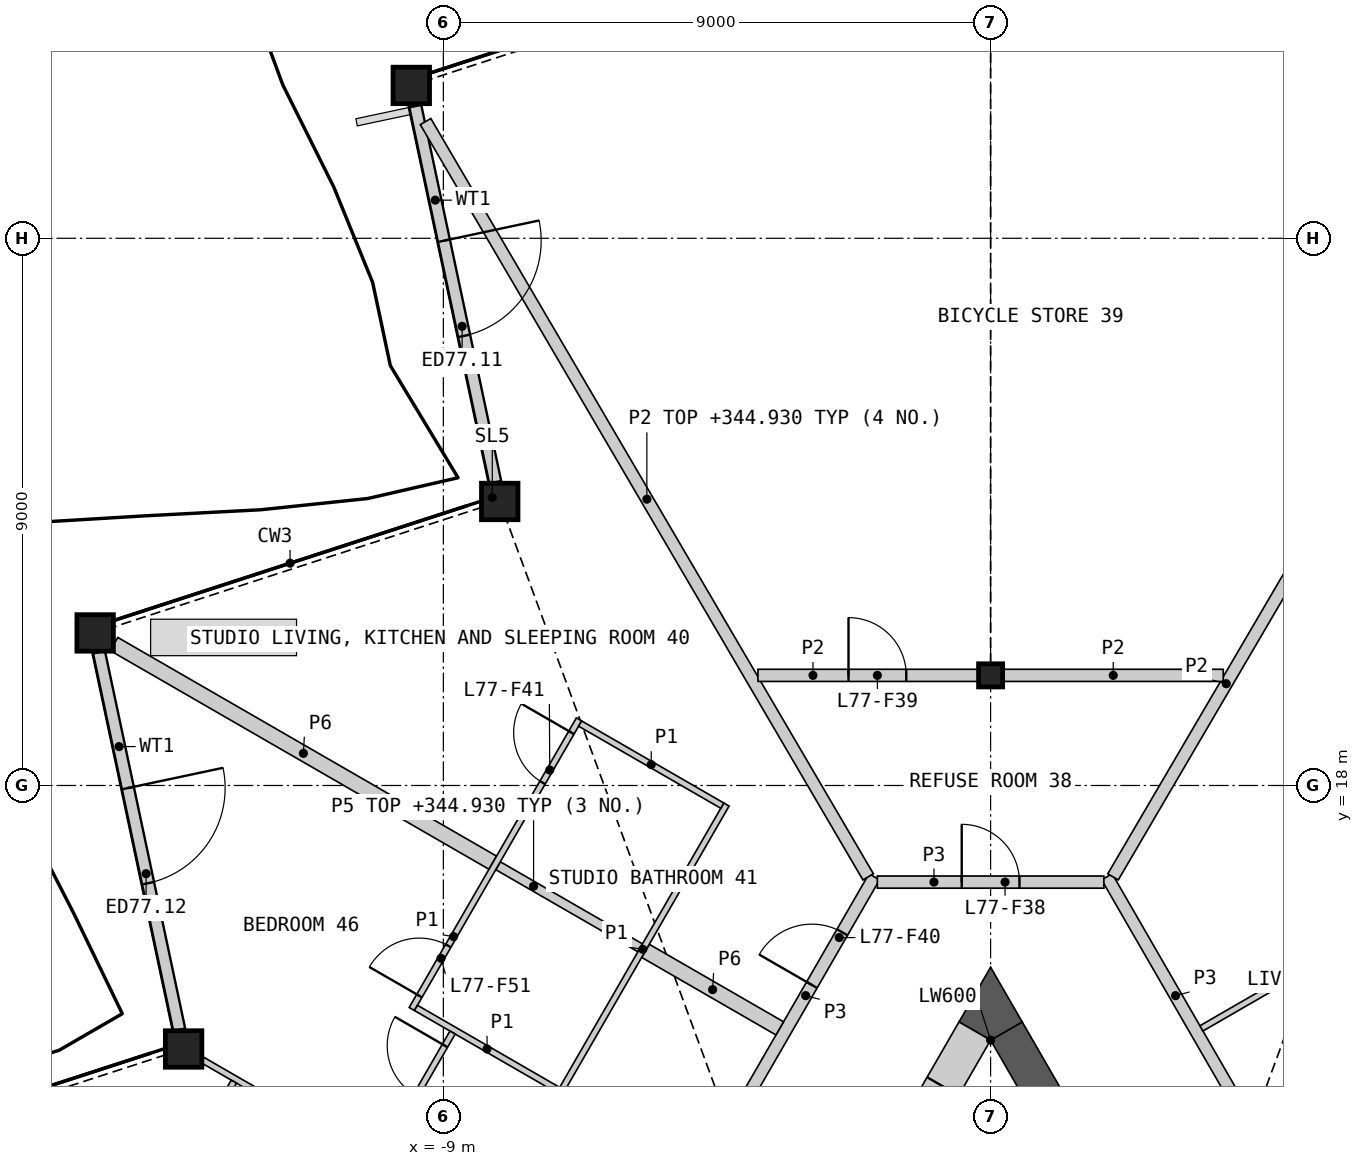
"""IFC4 building model, lengths in metres.
Left out: names, types, materials, properties, quantities, classifications, styles, units other than length and angle.
Written with IfcOpenShell. Run it as: python <this file> out.ifc"""

import sys

from ifc_helpers import new_model, si_unit, direction, frame, frame_2d, origin, origin_2d, place, context, subcontext, project, spatial, polyline, rectangle, hollow_rectangle, i_section, outline, extrude, element, fill, save


model = new_model("IFC4")
c1 = context("Model", 3, precision=1e-05, world=origin(), true_north=direction((0.0, 1.0)))
c2 = subcontext(c1, "Body", "Model", "MODEL_VIEW")
j1 = project(units=[si_unit("LENGTHUNIT", "METRE"), si_unit("PLANEANGLEUNIT", "RADIAN")], contexts=[c1])
p1 = place(None, origin())
s1 = spatial("IfcSite", under=j1, at=p1, CompositionType="ELEMENT")
p2 = place(p1, origin())
s2 = spatial("IfcBuilding", under=s1, at=p2, CompositionType="ELEMENT")
p3 = place(p2, frame((0.0, 0.0, 342.6)))
s3 = spatial("IfcBuildingStorey", under=s2, at=p3, CompositionType="ELEMENT", Elevation=342.6)
for number, where, z_axis, x_axis in (
    (1, (-9.527, 29.514, 0.0), (0.0, 0.0, 1.0), (1.0, 0.0, 0.0)),
    (2, (-8.073, 22.671, 0.0), (0.0, 0.0, 1.0), (1.0, 0.0, 0.0)),
    (3, (-14.727, 20.509, 0.0), (0.0, 0.0, 1.0), (1.0, 0.0, 0.0)),
    (4, (-13.272, 13.666, 0.0), (0.0, 0.0, 1.0), (1.0, 0.0, 0.0)),
):
    element("IfcColumn", number, at=place(p3, frame(where, z_axis=z_axis, x_axis=x_axis)), inside=s3, PredefinedType="COLUMN", context=c2, shape_type="SweptSolid", body=[
        extrude(hollow_rectangle(XDim=0.6, YDim=0.6, WallThickness=0.04, at=origin_2d()), origin(), (0.0, 0.0, 1.0), 3.4),
    ])
p4 = place(p3, frame((0.0, 19.811, 0.0), z_axis=(0.0, 0.0, 1.0), x_axis=(1.0, 0.0, 0.0)))
e5 = element("IfcColumn", 5, at=p4, inside=s3, PredefinedType="COLUMN", context=c2, shape_type="SweptSolid", body=[
    extrude(i_section(OverallWidth=0.396, OverallDepth=0.381, WebThickness=0.019, FlangeThickness=0.03, at=origin_2d()), origin(), (0.0, 0.0, 1.0), 3.4),
])
p5 = place(p3, frame((9.206, 29.616, 0.0), z_axis=(0.0, 0.0, 1.0), x_axis=(-0.951056221468, 0.309017901757, 0.0)))
e6 = element("IfcWall", 6, at=p5, inside=s3, PredefinedType="SOLIDWALL", context=c2, shape_type="SweptSolid", body=[
    extrude(rectangle(XDim=6.316, YDim=0.2, at=frame_2d((3.158, 0.0))), origin(), (0.0, 0.0, 1.0), 2.488),
])
p6 = place(p5, frame((2.263, 0.0, 0.0)))
e7 = element("IfcOpeningElement", 7, at=p6, cuts=e6, PredefinedType="OPENING", context=c2, shape_type="SweptSolid", body=[
    extrude(rectangle(XDim=1.6, YDim=2.25, at=frame_2d((0.8, 1.125))), frame((0.0, 0.11, 0.0), z_axis=(0.0, -1.0, 0.0), x_axis=(1.0, 0.0, 0.0)), (0.0, 0.0, 1.0), 0.22),
])
p7 = place(p3, frame((-9.461, 29.174, 0.0), z_axis=(0.0, 0.0, 1.0), x_axis=(0.20791277238, -0.97814737084, 0.0)))
e8 = element("IfcWall", 8, at=p7, inside=s3, PredefinedType="SOLIDWALL", context=c2, shape_type="SweptSolid", body=[
    extrude(rectangle(XDim=6.324, YDim=0.2, at=frame_2d((3.162, 0.0))), origin(), (0.0, 0.0, 1.0), 2.488),
])
p8 = place(p7, frame((2.263, 0.0, 0.0)))
e9 = element("IfcOpeningElement", 9, at=p8, cuts=e8, PredefinedType="OPENING", context=c2, shape_type="SweptSolid", body=[
    extrude(rectangle(XDim=1.6, YDim=2.25, at=frame_2d((0.8, 1.125))), frame((0.0, 0.11, 0.0), z_axis=(0.0, -1.0, 0.0), x_axis=(1.0, 0.0, 0.0)), (0.0, 0.0, 1.0), 0.22),
])
p9 = place(p3, frame((-14.663, 20.192, 0.0), z_axis=(0.0, 0.0, 1.0), x_axis=(0.207897850695, -0.97815054244, 0.0)))
e10 = element("IfcWall", 10, at=p9, inside=s3, PredefinedType="SOLIDWALL", context=c2, shape_type="SweptSolid", body=[
    extrude(rectangle(XDim=6.348, YDim=0.2, at=frame_2d((3.174, 0.0))), origin(), (0.0, 0.0, 1.0), 2.488),
])
p10 = place(p9, frame((2.285, 0.0, 0.0)))
e11 = element("IfcOpeningElement", 11, at=p10, cuts=e10, PredefinedType="OPENING", context=c2, shape_type="SweptSolid", body=[
    extrude(rectangle(XDim=1.6, YDim=2.25, at=frame_2d((0.8, 1.125))), frame((0.0, 0.11, 0.0), z_axis=(0.0, -1.0, 0.0), x_axis=(1.0, 0.0, 0.0)), (0.0, 0.0, 1.0), 0.22),
])
p11 = place(p3, frame((2.361, 10.322, 0.0), z_axis=(0.0, 0.0, 1.0), x_axis=(-0.500000735859, 0.866024978935, 0.0)))
e12 = element("IfcWall", 12, at=p11, inside=s3, PredefinedType="SHEAR", context=c2, shape_type="SweptSolid", body=[
    extrude(rectangle(XDim=4.202, YDim=0.6, at=frame_2d((2.101, 0.0))), origin(), (0.0, 0.0, 1.0), 3.1),
])
p12 = place(p3, origin())
e13 = element("IfcWall", 13, at=p12, inside=s3, PredefinedType="SHEAR", context=c2, shape_type="SweptSolid", body=[
    extrude(outline(polyline([(0.0, 13.811), (-0.52, 14.111), (0.0, 15.011), (0.52, 14.111), (0.0, 13.811)])), origin(), (0.0, 0.0, 1.0), 3.1),
])
p13 = place(p3, frame((-0.26, 13.961, 0.0), z_axis=(0.0, 0.0, 1.0), x_axis=(-0.49997936161, -0.866037319036, 0.0)))
e14 = element("IfcWall", 14, at=p13, inside=s3, PredefinedType="SHEAR", context=c2, shape_type="SweptSolid", body=[
    extrude(rectangle(XDim=2.66, YDim=0.6, at=frame_2d((1.33, 0.0))), origin(), (0.0, 0.0, 1.0), 3.1),
])
p14 = place(p13, frame((1.05, 0.0, 0.0)))
e15 = element("IfcOpeningElement", 15, at=p14, cuts=e14, PredefinedType="OPENING", context=c2, shape_type="SweptSolid", body=[
    extrude(rectangle(XDim=1.0, YDim=2.1, at=frame_2d((0.5, 1.05))), frame((0.0, 0.31, 0.0), z_axis=(0.0, -1.0, 0.0), x_axis=(1.0, 0.0, 0.0)), (0.0, 0.0, 1.0), 0.62),
])
p15 = place(p3, frame((-14.417, 20.327, 0.0), z_axis=(0.0, 0.0, 1.0), x_axis=(0.866018271907, -0.50001235257, 0.0)))
e16 = element("IfcWall", 16, at=p15, inside=s3, PredefinedType="PARTITIONING", context=c2, shape_type="SweptSolid", body=[
    extrude(rectangle(XDim=7.193, YDim=0.25, at=frame_2d((3.596, 0.0))), origin(), (0.0, 0.0, 1.0), 2.33),
])
p16 = place(p3, frame((-4.169, 12.59, 0.0), z_axis=(0.0, 0.0, 1.0), x_axis=(0.499950370306, 0.866054055606, 0.0)))
e17 = element("IfcWall", 17, at=p16, inside=s3, PredefinedType="PARTITIONING", context=c2, shape_type="SweptSolid", body=[
    extrude(rectangle(XDim=4.513, YDim=0.2, at=frame_2d((2.256, 0.0))), origin(), (0.0, 0.0, 1.0), 3.1),
])
p17 = place(p16, frame((2.459, 0.0, 0.0)))
e18 = element("IfcOpeningElement", 18, at=p17, cuts=e17, PredefinedType="OPENING", context=c2, shape_type="SweptSolid", body=[
    extrude(rectangle(XDim=1.0, YDim=2.1, at=frame_2d((0.5, 1.05))), frame((0.0, 0.11, 0.0), z_axis=(0.0, -1.0, 0.0), x_axis=(1.0, 0.0, 0.0)), (0.0, 0.0, 1.0), 0.22),
])
p18 = place(p3, frame((1.913, 16.498, 0.0), z_axis=(0.0, 0.0, 1.0), x_axis=(0.499950370306, -0.866054055606, 0.0)))
e19 = element("IfcWall", 19, at=p18, inside=s3, PredefinedType="PARTITIONING", context=c2, shape_type="SweptSolid", body=[
    extrude(rectangle(XDim=4.513, YDim=0.2, at=frame_2d((2.256, 0.0))), origin(), (0.0, 0.0, 1.0), 3.1),
])
p19 = place(p3, frame((-1.863, 16.411, 0.0), z_axis=(0.0, 0.0, 1.0), x_axis=(1.0, 0.0, 0.0)))
e20 = element("IfcWall", 20, at=p19, inside=s3, PredefinedType="PARTITIONING", context=c2, shape_type="SweptSolid", body=[
    extrude(rectangle(XDim=3.726, YDim=0.2, at=frame_2d((1.863, 0.0))), origin(), (0.0, 0.0, 1.0), 3.1),
])
p20 = place(p19, frame((1.388, 0.0, 0.0)))
e21 = element("IfcOpeningElement", 21, at=p20, cuts=e20, PredefinedType="OPENING", context=c2, shape_type="SweptSolid", body=[
    extrude(rectangle(XDim=0.95, YDim=2.1, at=frame_2d((0.475, 1.05))), frame((0.0, 0.11, 0.0), z_axis=(0.0, -1.0, 0.0), x_axis=(1.0, 0.0, 0.0)), (0.0, 0.0, 1.0), 0.22),
])
p21 = place(p3, frame((-5.676, 15.28, 0.0), z_axis=(0.0, 0.0, 1.0), x_axis=(0.865989465428, -0.500062241894, 0.0)))
e22 = element("IfcWall", 22, at=p21, inside=s3, PredefinedType="PARTITIONING", context=c2, shape_type="SweptSolid", body=[
    extrude(rectangle(XDim=2.55, YDim=0.25, at=frame_2d((1.275, 0.0))), origin(), (0.0, 0.0, 1.0), 2.33),
])
p22 = place(p3, frame((-9.292, 28.919, 0.0), z_axis=(0.0, 0.0, 1.0), x_axis=(0.505558038556, -0.862792599442, 0.0)))
e23 = element("IfcWall", 23, at=p22, inside=s3, PredefinedType="PARTITIONING", context=c2, shape_type="SweptSolid", body=[
    extrude(rectangle(XDim=14.397, YDim=0.2, at=frame_2d((7.199, 0.0))), origin(), (0.0, 0.0, 1.0), 2.33),
])
p23 = place(p3, frame((2.014, 16.497, 0.0), z_axis=(0.0, 0.0, 1.0), x_axis=(0.5055676136, 0.862786988821, 0.0)))
e24 = element("IfcWall", 24, at=p23, inside=s3, PredefinedType="PARTITIONING", context=c2, shape_type="SweptSolid", body=[
    extrude(rectangle(XDim=14.728, YDim=0.2, at=frame_2d((7.364, 0.0))), origin(), (0.0, 0.0, 1.0), 2.33),
])
p24 = place(p3, frame((-3.826, 19.811, 0.0), z_axis=(0.0, 0.0, 1.0), x_axis=(1.0, 0.0, 0.0)))
e25 = element("IfcWall", 25, at=p24, inside=s3, PredefinedType="PARTITIONING", context=c2, shape_type="SweptSolid", body=[
    extrude(rectangle(XDim=3.618, YDim=0.2, at=frame_2d((1.809, 0.0))), origin(), (0.0, 0.0, 1.0), 2.33),
])
p25 = place(p24, frame((1.489, 0.0, 0.0)))
e26 = element("IfcOpeningElement", 26, at=p25, cuts=e25, PredefinedType="OPENING", context=c2, shape_type="SweptSolid", body=[
    extrude(rectangle(XDim=0.95, YDim=2.1, at=frame_2d((0.475, 1.05))), frame((0.0, 0.11, 0.0), z_axis=(0.0, -1.0, 0.0), x_axis=(1.0, 0.0, 0.0)), (0.0, 0.0, 1.0), 0.22),
])
p26 = place(p3, frame((0.208, 19.811, 0.0), z_axis=(0.0, 0.0, 1.0), x_axis=(1.0, 0.0, 0.0)))
e27 = element("IfcWall", 27, at=p26, inside=s3, PredefinedType="PARTITIONING", context=c2, shape_type="SweptSolid", body=[
    extrude(rectangle(XDim=3.618, YDim=0.2, at=frame_2d((1.809, 0.0))), origin(), (0.0, 0.0, 1.0), 2.33),
])
p27 = place(p3, frame((-8.101, 16.68, 0.0), z_axis=(0.0, 0.0, 1.0), x_axis=(0.866019956843, -0.50000943426, 0.0)))
e28 = element("IfcWall", 28, at=p27, inside=s3, PredefinedType="PLUMBINGWALL", context=c2, shape_type="SweptSolid", body=[
    extrude(rectangle(XDim=2.7, YDim=0.15, at=frame_2d((1.35, 0.0))), origin(), (0.0, 0.0, 1.0), 2.33),
])
p28 = place(p3, frame((3.468, 14.005, 0.0), z_axis=(0.0, 0.0, 1.0), x_axis=(0.866020616849, 0.500008291124, 0.0)))
e29 = element("IfcWall", 29, at=p28, inside=s3, PredefinedType="PARTITIONING", context=c2, shape_type="SweptSolid", body=[
    extrude(rectangle(XDim=12.643, YDim=0.1, at=frame_2d((6.321, 0.0))), origin(), (0.0, 0.0, 1.0), 2.33),
])
p29 = place(p28, frame((8.115, 0.0, 0.0)))
e30 = element("IfcOpeningElement", 30, at=p29, cuts=e29, PredefinedType="OPENING", context=c2, shape_type="SweptSolid", body=[
    extrude(rectangle(XDim=0.95, YDim=2.1, at=frame_2d((0.475, 1.05))), frame((0.0, 0.06, 0.0), z_axis=(0.0, -1.0, 0.0), x_axis=(1.0, 0.0, 0.0)), (0.0, 0.0, 1.0), 0.12),
])
p30 = place(p3, frame((-12.962, 13.485, 0.0), z_axis=(0.0, 0.0, 1.0), x_axis=(0.866021168401, -0.500007335828, 0.0)))
e31 = element("IfcWall", 31, at=p30, inside=s3, PredefinedType="PARTITIONING", context=c2, shape_type="SweptSolid", body=[
    extrude(rectangle(XDim=7.962, YDim=0.1, at=frame_2d((3.981, 0.0))), origin(), (0.0, 0.0, 1.0), 2.33),
])
p31 = place(p30, frame((2.154, 0.0, 0.0)))
e32 = element("IfcOpeningElement", 32, at=p31, cuts=e31, PredefinedType="OPENING", context=c2, shape_type="SweptSolid", body=[
    extrude(rectangle(XDim=0.95, YDim=2.1, at=frame_2d((0.475, 1.05))), frame((0.0, 0.06, 0.0), z_axis=(0.0, -1.0, 0.0), x_axis=(1.0, 0.0, 0.0)), (0.0, 0.0, 1.0), 0.12),
])
p32 = place(p3, frame((-7.094, 12.924, 0.0), z_axis=(0.0, 0.0, 1.0), x_axis=(0.499996545922, 0.866027397988, 0.0)))
e33 = element("IfcWall", 33, at=p32, inside=s3, PredefinedType="PARTITIONING", context=c2, shape_type="SweptSolid", body=[
    extrude(rectangle(XDim=5.5, YDim=0.1, at=frame_2d((2.75, 0.0))), origin(), (0.0, 0.0, 1.0), 2.33),
])
p33 = place(p3, frame((-9.519, 14.323, 0.0), z_axis=(0.0, 0.0, 1.0), x_axis=(0.499996545922, 0.866027397988, 0.0)))
e34 = element("IfcWall", 34, at=p33, inside=s3, PredefinedType="PARTITIONING", context=c2, shape_type="SweptSolid", body=[
    extrude(rectangle(XDim=5.5, YDim=0.1, at=frame_2d((2.75, 0.0))), origin(), (0.0, 0.0, 1.0), 2.33),
])
p34 = place(p33, frame((4.3, 0.0, 0.0)))
e35 = element("IfcOpeningElement", 35, at=p34, cuts=e34, PredefinedType="OPENING", context=c2, shape_type="SweptSolid", body=[
    extrude(rectangle(XDim=0.95, YDim=2.1, at=frame_2d((0.475, 1.05))), frame((0.0, 0.06, 0.0), z_axis=(0.0, -1.0, 0.0), x_axis=(1.0, 0.0, 0.0)), (0.0, 0.0, 1.0), 0.12),
])
p35 = place(p33, frame((0.25, 0.0, 0.0)))
e36 = element("IfcOpeningElement", 36, at=p35, cuts=e34, PredefinedType="OPENING", context=c2, shape_type="SweptSolid", body=[
    extrude(rectangle(XDim=0.95, YDim=2.1, at=frame_2d((0.475, 1.05))), frame((0.0, 0.06, 0.0), z_axis=(0.0, -1.0, 0.0), x_axis=(1.0, 0.0, 0.0)), (0.0, 0.0, 1.0), 0.12),
])
p36 = place(p3, frame((-14.994, 8.714, 0.0), z_axis=(0.0, 0.0, 1.0), x_axis=(0.500012659481, 0.866018094706, 0.0)))
e37 = element("IfcWall", 37, at=p36, inside=s3, PredefinedType="PARTITIONING", context=c2, shape_type="SweptSolid", body=[
    extrude(rectangle(XDim=5.097, YDim=0.1, at=frame_2d((2.549, 0.0))), origin(), (0.0, 0.0, 1.0), 2.33),
])
p37 = place(p36, frame((2.175, 0.0, 0.0)))
e38 = element("IfcOpeningElement", 38, at=p37, cuts=e37, PredefinedType="OPENING", context=c2, shape_type="SweptSolid", body=[
    extrude(rectangle(XDim=0.95, YDim=2.1, at=frame_2d((0.475, 1.05))), frame((0.0, 0.06, 0.0), z_axis=(0.0, -1.0, 0.0), x_axis=(1.0, 0.0, 0.0)), (0.0, 0.0, 1.0), 0.12),
])
for number, where, z_axis, x_axis in (
    (39, (-9.451, 14.342, 0.0), (0.0, 0.0, 1.0), (0.866, -0.5, 0.0)),
    (40, (-6.751, 19.018, 0.0), (0.0, 0.0, 1.0), (0.866, -0.5, 0.0)),
):
    element("IfcWall", number, at=place(p3, frame(where, z_axis=z_axis, x_axis=x_axis)), inside=s3, PredefinedType="PARTITIONING", context=c2, shape_type="SweptSolid", body=[
        extrude(rectangle(XDim=2.7, YDim=0.1, at=frame_2d((1.35, 0.0))), origin(), (0.0, 0.0, 1.0), 2.33),
    ])
p38 = place(p3, frame((-10.047, 11.86, 0.0), z_axis=(0.0, 0.0, 1.0), x_axis=(0.500092661743, 0.865971898892, 0.0)))
e41 = element("IfcWall", 41, at=p38, inside=s3, PredefinedType="PARTITIONING", context=c2, shape_type="SweptSolid", body=[
    extrude(rectangle(XDim=2.397, YDim=0.1, at=frame_2d((1.199, 0.0))), origin(), (0.0, 0.0, 1.0), 2.33),
])
p39 = place(p38, frame((1.198, 0.0, 0.0)))
e42 = element("IfcOpeningElement", 42, at=p39, cuts=e41, PredefinedType="OPENING", context=c2, shape_type="SweptSolid", body=[
    extrude(rectangle(XDim=0.95, YDim=2.1, at=frame_2d((0.475, 1.05))), frame((0.0, 0.06, 0.0), z_axis=(0.0, -1.0, 0.0), x_axis=(1.0, 0.0, 0.0)), (0.0, 0.0, 1.0), 0.12),
])
p40 = place(p8, origin())
e43 = element("IfcDoor", 43, at=p40, inside=s3, OperationType="DOUBLE_DOOR_SINGLE_SWING", PredefinedType="DOOR", context=c2, shape_type="SweptSolid", body=[
    extrude(rectangle(XDim=1.6, YDim=2.25, at=frame_2d((0.8, 1.125))), frame((0.0, 0.025, 0.0), z_axis=(0.0, -1.0, 0.0), x_axis=(1.0, 0.0, 0.0)), (0.0, 0.0, 1.0), 0.05),
])
fill(e9, e43)
p41 = place(p10, origin())
e44 = element("IfcDoor", 44, at=p41, inside=s3, OperationType="DOUBLE_DOOR_SINGLE_SWING", PredefinedType="DOOR", context=c2, shape_type="SweptSolid", body=[
    extrude(rectangle(XDim=1.6, YDim=2.25, at=frame_2d((0.8, 1.125))), frame((0.0, 0.025, 0.0), z_axis=(0.0, -1.0, 0.0), x_axis=(1.0, 0.0, 0.0)), (0.0, 0.0, 1.0), 0.05),
])
fill(e11, e44)
p42 = place(p20, origin())
e45 = element("IfcDoor", 45, at=p42, inside=s3, OperationType="SINGLE_SWING_LEFT", PredefinedType="DOOR", context=c2, shape_type="SweptSolid", body=[
    extrude(rectangle(XDim=0.95, YDim=2.1, at=frame_2d((0.475, 1.05))), frame((0.0, 0.025, 0.0), z_axis=(0.0, -1.0, 0.0), x_axis=(1.0, 0.0, 0.0)), (0.0, 0.0, 1.0), 0.05),
])
fill(e21, e45)
p43 = place(p25, origin())
e46 = element("IfcDoor", 46, at=p43, inside=s3, OperationType="SINGLE_SWING_LEFT", PredefinedType="DOOR", context=c2, shape_type="SweptSolid", body=[
    extrude(rectangle(XDim=0.95, YDim=2.1, at=frame_2d((0.475, 1.05))), frame((0.0, 0.025, 0.0), z_axis=(0.0, -1.0, 0.0), x_axis=(1.0, 0.0, 0.0)), (0.0, 0.0, 1.0), 0.05),
])
fill(e26, e46)
p44 = place(p17, origin())
e47 = element("IfcDoor", 47, at=p44, inside=s3, OperationType="SINGLE_SWING_LEFT", PredefinedType="DOOR", context=c2, shape_type="SweptSolid", body=[
    extrude(rectangle(XDim=1.0, YDim=2.1, at=frame_2d((0.5, 1.05))), frame((0.0, 0.025, 0.0), z_axis=(0.0, -1.0, 0.0), x_axis=(1.0, 0.0, 0.0)), (0.0, 0.0, 1.0), 0.05),
])
fill(e18, e47)
p45 = place(p34, origin())
e48 = element("IfcDoor", 48, at=p45, inside=s3, OperationType="SINGLE_SWING_RIGHT", PredefinedType="DOOR", context=c2, shape_type="SweptSolid", body=[
    extrude(rectangle(XDim=0.95, YDim=2.1, at=frame_2d((0.475, 1.05))), frame((0.0, 0.025, 0.0), z_axis=(0.0, -1.0, 0.0), x_axis=(1.0, 0.0, 0.0)), (0.0, 0.0, 1.0), 0.05),
])
fill(e35, e48)
p46 = place(p39, origin())
e49 = element("IfcDoor", 49, at=p46, inside=s3, OperationType="SINGLE_SWING_RIGHT", PredefinedType="DOOR", context=c2, shape_type="SweptSolid", body=[
    extrude(rectangle(XDim=0.95, YDim=2.1, at=frame_2d((0.475, 1.05))), frame((0.0, 0.025, 0.0), z_axis=(0.0, -1.0, 0.0), x_axis=(1.0, 0.0, 0.0)), (0.0, 0.0, 1.0), 0.05),
])
fill(e42, e49)
p47 = place(p35, origin())
e50 = element("IfcDoor", 50, at=p47, inside=s3, OperationType="SINGLE_SWING_LEFT", PredefinedType="DOOR", context=c2, shape_type="SweptSolid", body=[
    extrude(rectangle(XDim=0.95, YDim=2.1, at=frame_2d((0.475, 1.05))), frame((0.0, 0.025, 0.0), z_axis=(0.0, -1.0, 0.0), x_axis=(1.0, 0.0, 0.0)), (0.0, 0.0, 1.0), 0.05),
])
fill(e36, e50)
save(model, sys.argv[1])
